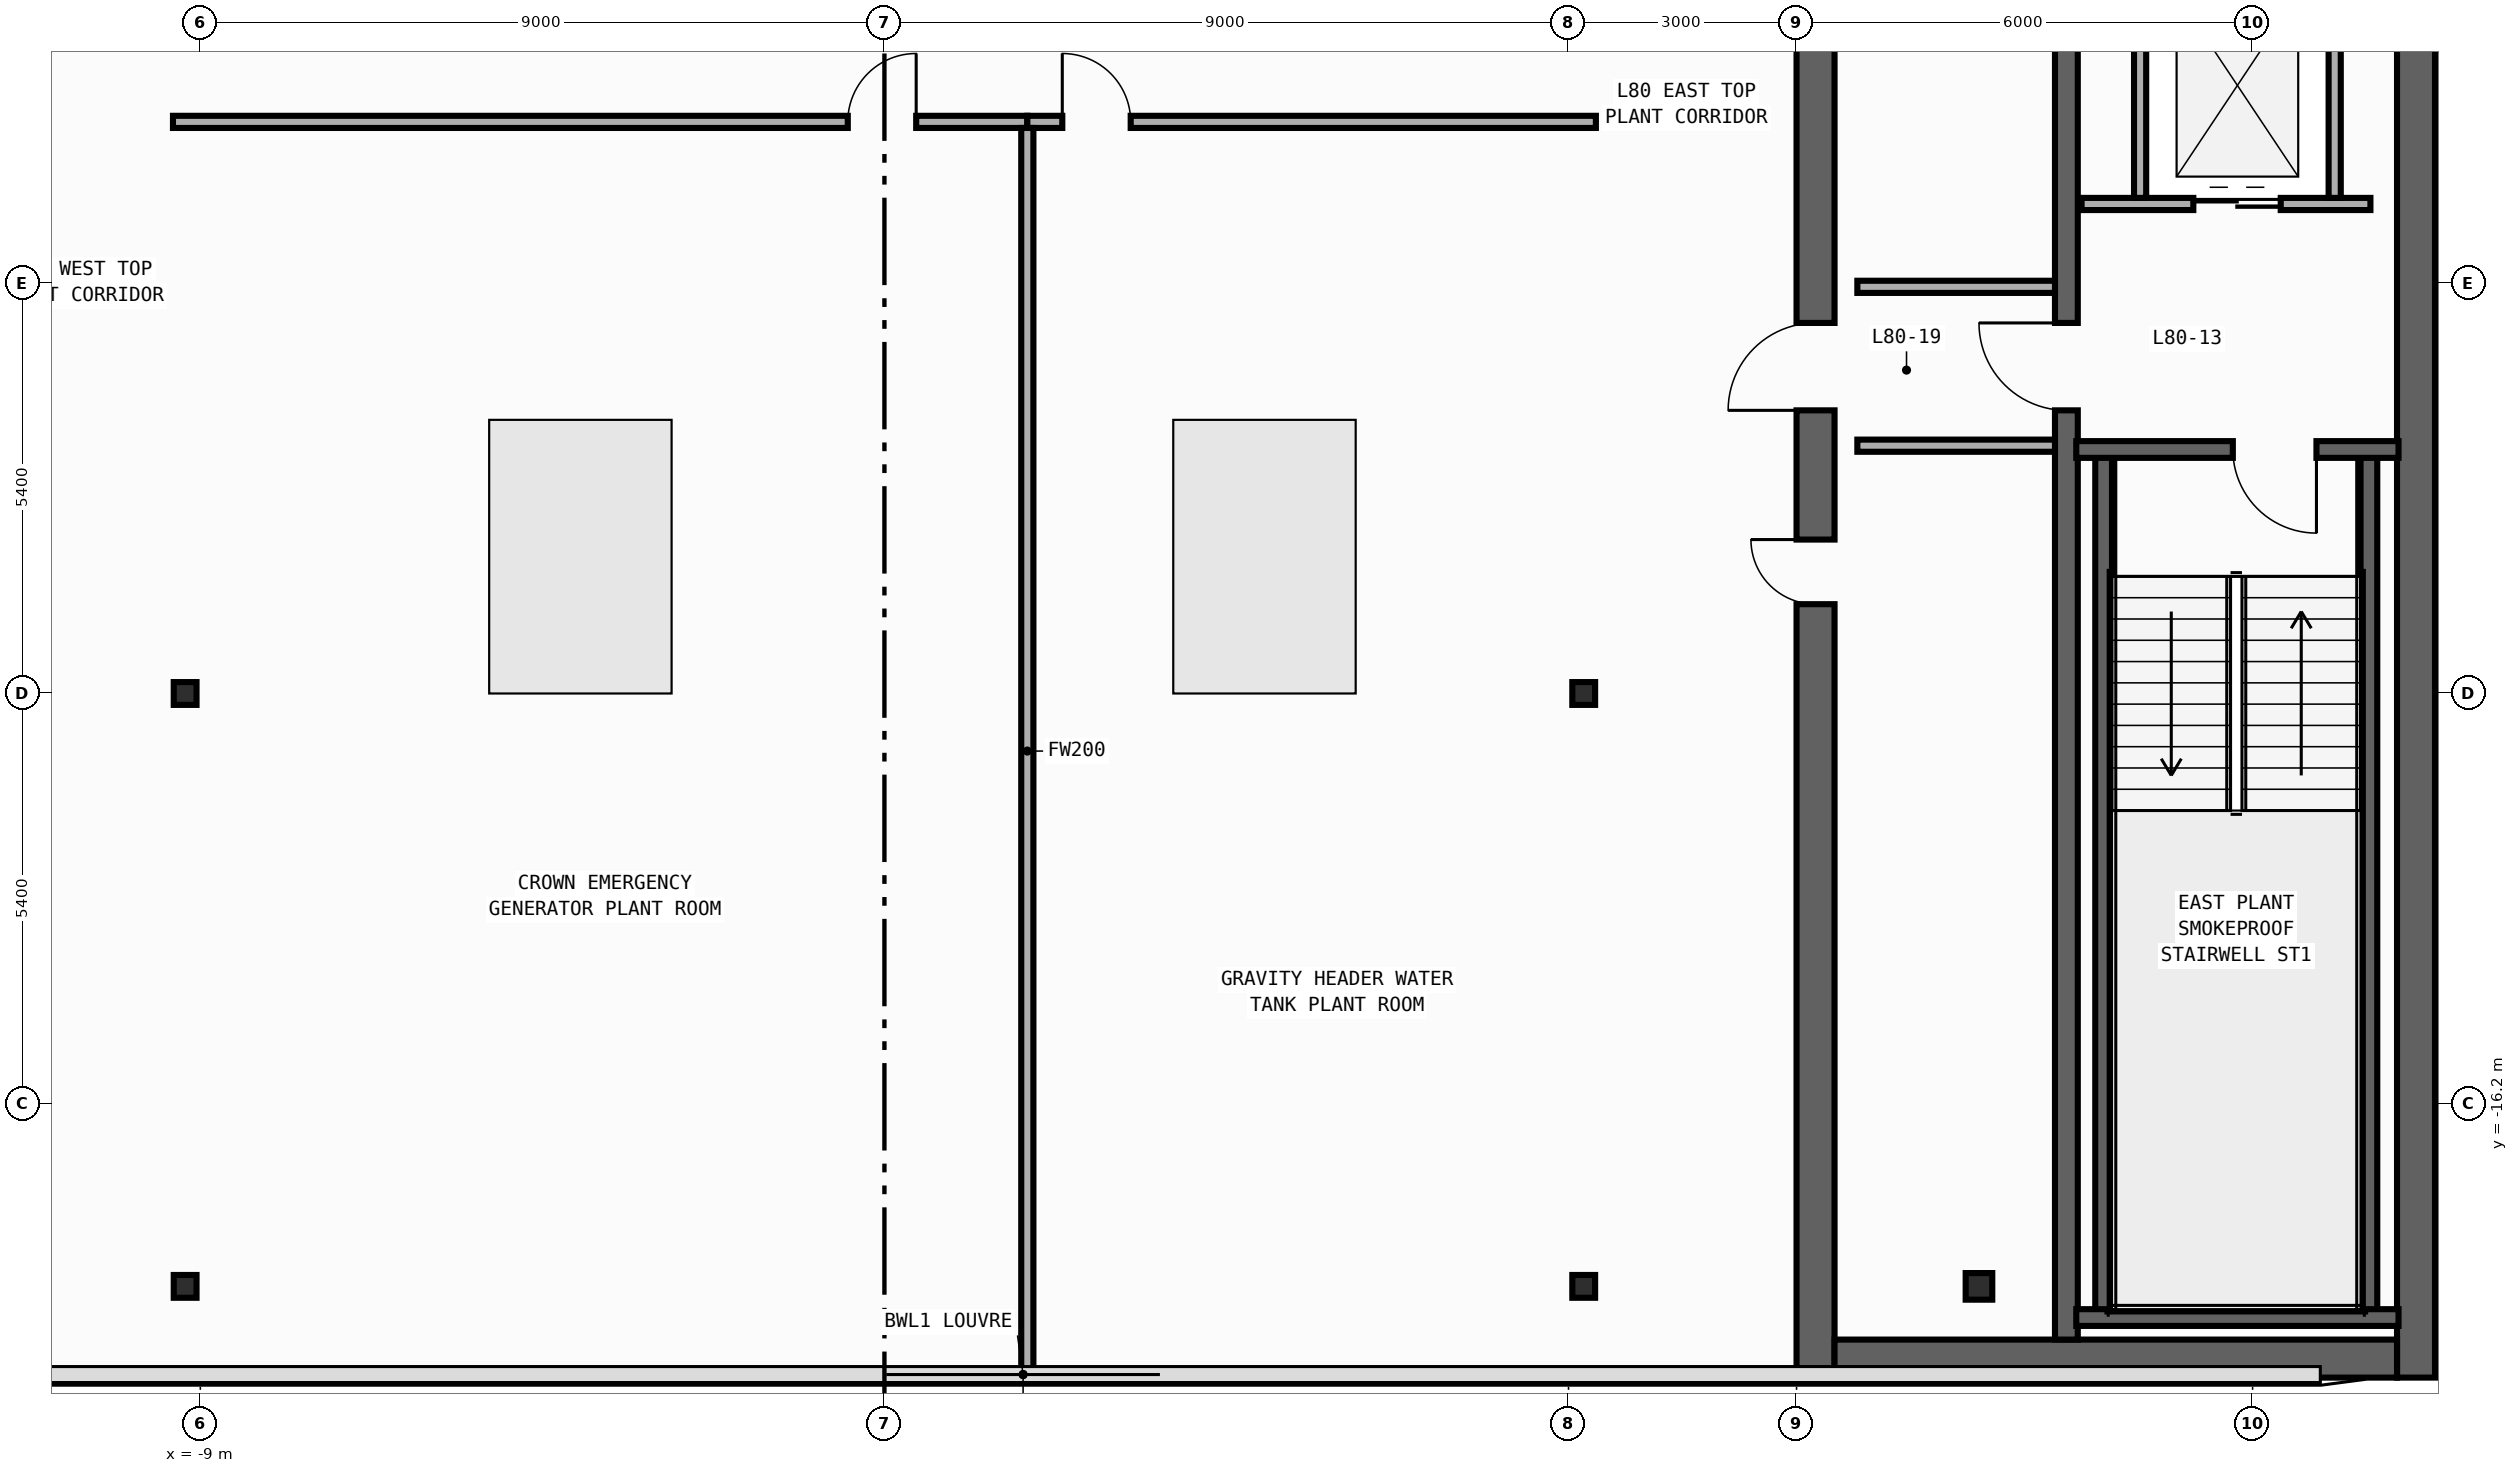
"""IFC4 building model, lengths in metres.
Left out: names, types, materials, properties, quantities, classifications, styles, units other than length and angle.
Written with IfcOpenShell. Run it as: python <this file> out.ifc"""

import sys

from ifc_helpers import new_model, si_unit, direction, frame, frame_2d, origin, origin_2d, place, context, subcontext, project, spatial, rectangle, i_section, extrude, element, fill, save


model = new_model("IFC4")
c1 = context("Model", 3, precision=1e-05, world=origin(), true_north=direction((0.0, 1.0)))
c2 = subcontext(c1, "Body", "Model", "MODEL_VIEW")
j1 = project(units=[si_unit("LENGTHUNIT", "METRE"), si_unit("PLANEANGLEUNIT", "RADIAN")], contexts=[c1])
p1 = place(None, origin())
s1 = spatial("IfcSite", under=j1, at=p1, CompositionType="ELEMENT")
p2 = place(p1, origin())
s2 = spatial("IfcBuilding", under=s1, at=p2, CompositionType="ELEMENT")
p3 = place(p2, frame((0.0, 0.0, 335.0)))
s3 = spatial("IfcBuildingStorey", under=s2, at=p3, CompositionType="ELEMENT", Elevation=335.0)
p4 = place(p3, frame((12.25, -19.8, 0.0), z_axis=(0.0, 0.0, 1.0), x_axis=(0.0, 1.0, 0.0)))
e1 = element("IfcWall", 1, at=p4, inside=s3, PredefinedType="SHEAR", context=c2, shape_type="SweptSolid", body=[
    extrude(rectangle(XDim=27.0, YDim=0.5, at=frame_2d((13.5, 0.0))), origin(), (0.0, 0.0, 1.0), 4.22),
])
p5 = place(p4, frame((19.875, 0.0, 0.0)))
e2 = element("IfcOpeningElement", 2, at=p5, cuts=e1, PredefinedType="OPENING", context=c2, shape_type="SweptSolid", body=[
    extrude(rectangle(XDim=0.85, YDim=2.1, at=frame_2d((0.425, 1.05))), frame((0.0, 0.26, 0.0), z_axis=(0.0, -1.0, 0.0), x_axis=(1.0, 0.0, 0.0)), (0.0, 0.0, 1.0), 0.52),
])
p6 = place(p4, frame((10.175, 0.0, 0.0)))
e3 = element("IfcOpeningElement", 3, at=p6, cuts=e1, PredefinedType="OPENING", context=c2, shape_type="SweptSolid", body=[
    extrude(rectangle(XDim=0.85, YDim=2.1, at=frame_2d((0.425, 1.05))), frame((0.0, 0.26, 0.0), z_axis=(0.0, -1.0, 0.0), x_axis=(1.0, 0.0, 0.0)), (0.0, 0.0, 1.0), 0.52),
])
p7 = place(p4, frame((12.725, 0.0, 0.0)))
e4 = element("IfcOpeningElement", 4, at=p7, cuts=e1, PredefinedType="OPENING", context=c2, shape_type="SweptSolid", body=[
    extrude(rectangle(XDim=1.15, YDim=2.2, at=frame_2d((0.575, 1.1))), frame((0.0, 0.26, 0.0), z_axis=(0.0, -1.0, 0.0), x_axis=(1.0, 0.0, 0.0)), (0.0, 0.0, 1.0), 0.52),
])
p8 = place(p4, frame((25.125, 0.0, 0.0)))
e5 = element("IfcOpeningElement", 5, at=p8, cuts=e1, PredefinedType="OPENING", context=c2, shape_type="SweptSolid", body=[
    extrude(rectangle(XDim=0.85, YDim=2.1, at=frame_2d((0.425, 1.05))), frame((0.0, 0.26, 0.0), z_axis=(0.0, -1.0, 0.0), x_axis=(1.0, 0.0, 0.0)), (0.0, 0.0, 1.0), 0.52),
])
p9 = place(p3, frame((20.15, -19.8, 0.0), z_axis=(0.0, 0.0, 1.0), x_axis=(0.0, 1.0, 0.0)))
e6 = element("IfcWall", 6, at=p9, inside=s3, PredefinedType="SHEAR", context=c2, shape_type="SweptSolid", body=[
    extrude(rectangle(XDim=27.0, YDim=0.5, at=frame_2d((13.5, 0.0))), origin(), (0.0, 0.0, 1.0), 4.22),
])
p10 = place(p3, frame((12.5, -19.55, 0.0), z_axis=(0.0, 0.0, 1.0), x_axis=(1.0, 0.0, 0.0)))
e7 = element("IfcWall", 7, at=p10, inside=s3, PredefinedType="SHEAR", context=c2, shape_type="SweptSolid", body=[
    extrude(rectangle(XDim=7.4, YDim=0.5, at=frame_2d((3.7, 0.0))), origin(), (0.0, 0.0, 1.0), 4.22),
])
p11 = place(p3, frame((15.55, -19.3, 0.0), z_axis=(0.0, 0.0, 1.0), x_axis=(0.0, 1.0, 0.0)))
e8 = element("IfcWall", 8, at=p11, inside=s3, PredefinedType="SHEAR", context=c2, shape_type="SweptSolid", body=[
    extrude(rectangle(XDim=26.0, YDim=0.3, at=frame_2d((13.0, 0.0))), origin(), (0.0, 0.0, 1.0), 4.22),
])
p12 = place(p11, frame((12.225, 0.0, 0.0)))
e9 = element("IfcOpeningElement", 9, at=p12, cuts=e8, PredefinedType="OPENING", context=c2, shape_type="SweptSolid", body=[
    extrude(rectangle(XDim=1.15, YDim=2.2, at=frame_2d((0.575, 1.1))), frame((0.0, 0.16, 0.0), z_axis=(0.0, -1.0, 0.0), x_axis=(1.0, 0.0, 0.0)), (0.0, 0.0, 1.0), 0.32),
])
p13 = place(p11, frame((24.625, 0.0, 0.0)))
e10 = element("IfcOpeningElement", 10, at=p13, cuts=e8, PredefinedType="OPENING", context=c2, shape_type="SweptSolid", body=[
    extrude(rectangle(XDim=0.85, YDim=2.1, at=frame_2d((0.425, 1.05))), frame((0.0, 0.16, 0.0), z_axis=(0.0, -1.0, 0.0), x_axis=(1.0, 0.0, 0.0)), (0.0, 0.0, 1.0), 0.32),
])
for number, where, z_axis, x_axis in (
    (11, (16.04, -19.01, 0.0), (0.0, 0.0, 1.0), (0.0, 1.0, 0.0)),
    (12, (19.53, -19.01, 0.0), (0.0, 0.0, 1.0), (0.0, 1.0, 0.0)),
):
    element("IfcWall", number, at=place(p3, frame(where, z_axis=z_axis, x_axis=x_axis)), inside=s3, PredefinedType="SHEAR", context=c2, shape_type="SweptSolid", body=[
        extrude(rectangle(XDim=11.42, YDim=0.22, at=frame_2d((5.71, 0.0))), origin(), (0.0, 0.0, 1.0), 4.22),
    ])
p14 = place(p3, frame((15.68, -19.01, 0.0), z_axis=(0.0, 0.0, 1.0), x_axis=(1.0, 0.0, 0.0)))
e13 = element("IfcWall", 13, at=p14, inside=s3, PredefinedType="SHEAR", context=c2, shape_type="SweptSolid", body=[
    extrude(rectangle(XDim=4.24, YDim=0.22, at=frame_2d((2.12, 0.0))), origin(), (0.0, 0.0, 1.0), 4.22),
])
p15 = place(p3, frame((19.92, -7.59, 0.0), z_axis=(0.0, 0.0, 1.0), x_axis=(-1.0, 0.0, 0.0)))
e14 = element("IfcWall", 14, at=p15, inside=s3, PredefinedType="SHEAR", context=c2, shape_type="SweptSolid", body=[
    extrude(rectangle(XDim=4.24, YDim=0.22, at=frame_2d((2.12, 0.0))), origin(), (0.0, 0.0, 1.0), 4.22),
])
p16 = place(p15, frame((1.08, 0.0, 0.0)))
e15 = element("IfcOpeningElement", 15, at=p16, cuts=e14, PredefinedType="OPENING", context=c2, shape_type="SweptSolid", body=[
    extrude(rectangle(XDim=1.1, YDim=2.2, at=frame_2d((0.55, 1.1))), frame((0.0, 0.12, 0.0), z_axis=(0.0, -1.0, 0.0), x_axis=(1.0, 0.0, 0.0)), (0.0, 0.0, 1.0), 0.24),
])
for number, where, z_axis, x_axis in (
    (16, (-9.2, -18.6, 0.0), (0.0, 0.0, 1.0), (1.0, 0.0, 0.0)),
    (17, (-9.2, -10.8, 0.0), (0.0, 0.0, 1.0), (1.0, 0.0, 0.0)),
    (18, (9.2, -18.6, 0.0), (0.0, 0.0, 1.0), (1.0, 0.0, 0.0)),
    (19, (9.2, -10.8, 0.0), (0.0, 0.0, 1.0), (1.0, 0.0, 0.0)),
):
    element("IfcColumn", number, at=place(p3, frame(where, z_axis=z_axis, x_axis=x_axis)), inside=s3, PredefinedType="COLUMN", context=c2, shape_type="SweptSolid", body=[
        extrude(i_section(OverallWidth=0.3, OverallDepth=0.3, WebThickness=0.01, FlangeThickness=0.015, FilletRadius=0.018, at=origin_2d()), origin(), (0.0, 0.0, 1.0), 4.5),
    ])
p17 = place(p3, frame((14.4, -18.6, 0.0), z_axis=(0.0, 0.0, 1.0), x_axis=(1.0, 0.0, 0.0)))
e20 = element("IfcColumn", 20, at=p17, inside=s3, PredefinedType="COLUMN", context=c2, shape_type="SweptSolid", body=[
    extrude(i_section(OverallWidth=0.35, OverallDepth=0.35, WebThickness=0.012, FlangeThickness=0.019, FilletRadius=0.02, at=origin_2d()), origin(), (0.0, 0.0, 1.0), 4.5),
])
p18 = place(p3, frame((15.75, -4.36, 0.0), z_axis=(0.0, 0.0, 1.0), x_axis=(1.0, 0.0, 0.0)))
e21 = element("IfcWall", 21, at=p18, inside=s3, PredefinedType="STANDARD", context=c2, shape_type="SweptSolid", body=[
    extrude(rectangle(XDim=3.8, YDim=0.16, at=frame_2d((1.9, 0.0))), origin(), (0.0, 0.0, 1.0), 4.22),
])
p19 = place(p18, frame((1.47, 0.0, 0.0)))
e22 = element("IfcOpeningElement", 22, at=p19, cuts=e21, PredefinedType="OPENING", context=c2, shape_type="SweptSolid", body=[
    extrude(rectangle(XDim=1.15, YDim=2.2, at=frame_2d((0.575, 1.1))), frame((0.0, 0.09, 0.0), z_axis=(0.0, -1.0, 0.0), x_axis=(1.0, 0.0, 0.0)), (0.0, 0.0, 1.0), 0.18),
])
for number, where, z_axis, x_axis in (
    (23, (16.52, -4.28, 0.0), (0.0, 0.0, 1.0), (0.0, 1.0, 0.0)),
    (24, (19.08, -4.28, 0.0), (0.0, 0.0, 1.0), (0.0, 1.0, 0.0)),
):
    element("IfcWall", number, at=place(p3, frame(where, z_axis=z_axis, x_axis=x_axis)), inside=s3, PredefinedType="STANDARD", context=c2, shape_type="SweptSolid", body=[
        extrude(rectangle(XDim=2.98, YDim=0.16, at=frame_2d((1.49, 0.0))), origin(), (0.0, 0.0, 1.0), 4.22),
    ])
for number, where, z_axis, x_axis in (
    (25, (12.8, -5.45, 0.0), (0.0, 0.0, 1.0), (1.0, 0.0, 0.0)),
    (26, (12.8, -7.54, 0.0), (0.0, 0.0, 1.0), (1.0, 0.0, 0.0)),
):
    element("IfcWall", number, at=place(p3, frame(where, z_axis=z_axis, x_axis=x_axis)), inside=s3, PredefinedType="STANDARD", context=c2, shape_type="SweptSolid", body=[
        extrude(rectangle(XDim=2.6, YDim=0.16, at=frame_2d((1.3, 0.0))), origin(), (0.0, 0.0, 1.0), 4.22),
    ])
p20 = place(p3, frame((-9.36, -3.28, 0.0), z_axis=(0.0, 0.0, 1.0), x_axis=(1.0, 0.0, 0.0)))
e27 = element("IfcWall", 27, at=p20, inside=s3, PredefinedType="PARTITIONING", context=c2, shape_type="SweptSolid", body=[
    extrude(rectangle(XDim=11.24, YDim=0.16, at=frame_2d((5.62, 0.0))), origin(), (0.0, 0.0, 1.0), 4.22),
])
p21 = place(p20, frame((8.878, 0.0, 0.0)))
e28 = element("IfcOpeningElement", 28, at=p21, cuts=e27, PredefinedType="OPENING", context=c2, shape_type="SweptSolid", body=[
    extrude(rectangle(XDim=0.9, YDim=2.15, at=frame_2d((0.45, 1.075))), frame((0.0, 0.09, 0.0), z_axis=(0.0, -1.0, 0.0), x_axis=(1.0, 0.0, 0.0)), (0.0, 0.0, 1.0), 0.18),
])
p22 = place(p3, frame((1.88, -3.28, 0.0), z_axis=(0.0, 0.0, 1.0), x_axis=(1.0, 0.0, 0.0)))
e29 = element("IfcWall", 29, at=p22, inside=s3, PredefinedType="PARTITIONING", context=c2, shape_type="SweptSolid", body=[
    extrude(rectangle(XDim=7.48, YDim=0.16, at=frame_2d((3.74, 0.0))), origin(), (0.0, 0.0, 1.0), 4.22),
])
p23 = place(p22, frame((0.46, 0.0, 0.0)))
e30 = element("IfcOpeningElement", 30, at=p23, cuts=e29, PredefinedType="OPENING", context=c2, shape_type="SweptSolid", body=[
    extrude(rectangle(XDim=0.9, YDim=2.15, at=frame_2d((0.45, 1.075))), frame((0.0, 0.09, 0.0), z_axis=(0.0, -1.0, 0.0), x_axis=(1.0, 0.0, 0.0)), (0.0, 0.0, 1.0), 0.18),
])
p24 = place(p3, frame((1.88, -19.755, 0.0), z_axis=(0.0, 0.0, 1.0), x_axis=(0.0, 1.0, 0.0)))
e31 = element("IfcWall", 31, at=p24, inside=s3, PredefinedType="PARTITIONING", context=c2, shape_type="SweptSolid", body=[
    extrude(rectangle(XDim=16.395, YDim=0.16, at=frame_2d((8.197, 0.0))), origin(), (0.0, 0.0, 1.0), 4.22),
])
p25 = place(p16, origin())
e32 = element("IfcDoor", 32, at=p25, inside=s3, OperationType="SINGLE_SWING_LEFT", PredefinedType="DOOR", context=c2, shape_type="SweptSolid", body=[
    extrude(rectangle(XDim=1.1, YDim=2.2, at=frame_2d((0.55, 1.1))), frame((0.0, 0.025, 0.0), z_axis=(0.0, -1.0, 0.0), x_axis=(1.0, 0.0, 0.0)), (0.0, 0.0, 1.0), 0.05),
])
fill(e15, e32)
p26 = place(p6, origin())
e33 = element("IfcDoor", 33, at=p26, inside=s3, OperationType="SINGLE_SWING_RIGHT", PredefinedType="DOOR", context=c2, shape_type="SweptSolid", body=[
    extrude(rectangle(XDim=0.85, YDim=2.1, at=frame_2d((0.425, 1.05))), frame((0.0, 0.025, 0.0), z_axis=(0.0, -1.0, 0.0), x_axis=(1.0, 0.0, 0.0)), (0.0, 0.0, 1.0), 0.05),
])
fill(e3, e33)
p27 = place(p7, origin())
e34 = element("IfcDoor", 34, at=p27, inside=s3, OperationType="SINGLE_SWING_LEFT", PredefinedType="DOOR", context=c2, shape_type="SweptSolid", body=[
    extrude(rectangle(XDim=1.15, YDim=2.2, at=frame_2d((0.575, 1.1))), frame((0.0, 0.025, 0.0), z_axis=(0.0, -1.0, 0.0), x_axis=(1.0, 0.0, 0.0)), (0.0, 0.0, 1.0), 0.05),
])
fill(e4, e34)
p28 = place(p12, origin())
e35 = element("IfcDoor", 35, at=p28, inside=s3, OperationType="SINGLE_SWING_RIGHT", PredefinedType="DOOR", context=c2, shape_type="SweptSolid", body=[
    extrude(rectangle(XDim=1.15, YDim=2.2, at=frame_2d((0.575, 1.1))), frame((0.0, 0.025, 0.0), z_axis=(0.0, -1.0, 0.0), x_axis=(1.0, 0.0, 0.0)), (0.0, 0.0, 1.0), 0.05),
])
fill(e9, e35)
p29 = place(p19, origin())
e36 = element("IfcDoor", 36, at=p29, inside=s3, OperationType="DOUBLE_DOOR_SLIDING", PredefinedType="DOOR", context=c2, shape_type="SweptSolid", body=[
    extrude(rectangle(XDim=1.15, YDim=2.2, at=frame_2d((0.575, 1.1))), frame((0.0, 0.025, 0.0), z_axis=(0.0, -1.0, 0.0), x_axis=(1.0, 0.0, 0.0)), (0.0, 0.0, 1.0), 0.05),
])
fill(e22, e36)
p30 = place(p21, origin())
e37 = element("IfcDoor", 37, at=p30, inside=s3, OperationType="SINGLE_SWING_RIGHT", PredefinedType="DOOR", context=c2, shape_type="SweptSolid", body=[
    extrude(rectangle(XDim=0.9, YDim=2.15, at=frame_2d((0.45, 1.075))), frame((0.0, 0.025, 0.0), z_axis=(0.0, -1.0, 0.0), x_axis=(1.0, 0.0, 0.0)), (0.0, 0.0, 1.0), 0.05),
])
fill(e28, e37)
p31 = place(p23, origin())
e38 = element("IfcDoor", 38, at=p31, inside=s3, OperationType="SINGLE_SWING_LEFT", PredefinedType="DOOR", context=c2, shape_type="SweptSolid", body=[
    extrude(rectangle(XDim=0.9, YDim=2.15, at=frame_2d((0.45, 1.075))), frame((0.0, 0.025, 0.0), z_axis=(0.0, -1.0, 0.0), x_axis=(1.0, 0.0, 0.0)), (0.0, 0.0, 1.0), 0.05),
])
fill(e30, e38)
save(model, sys.argv[1])
